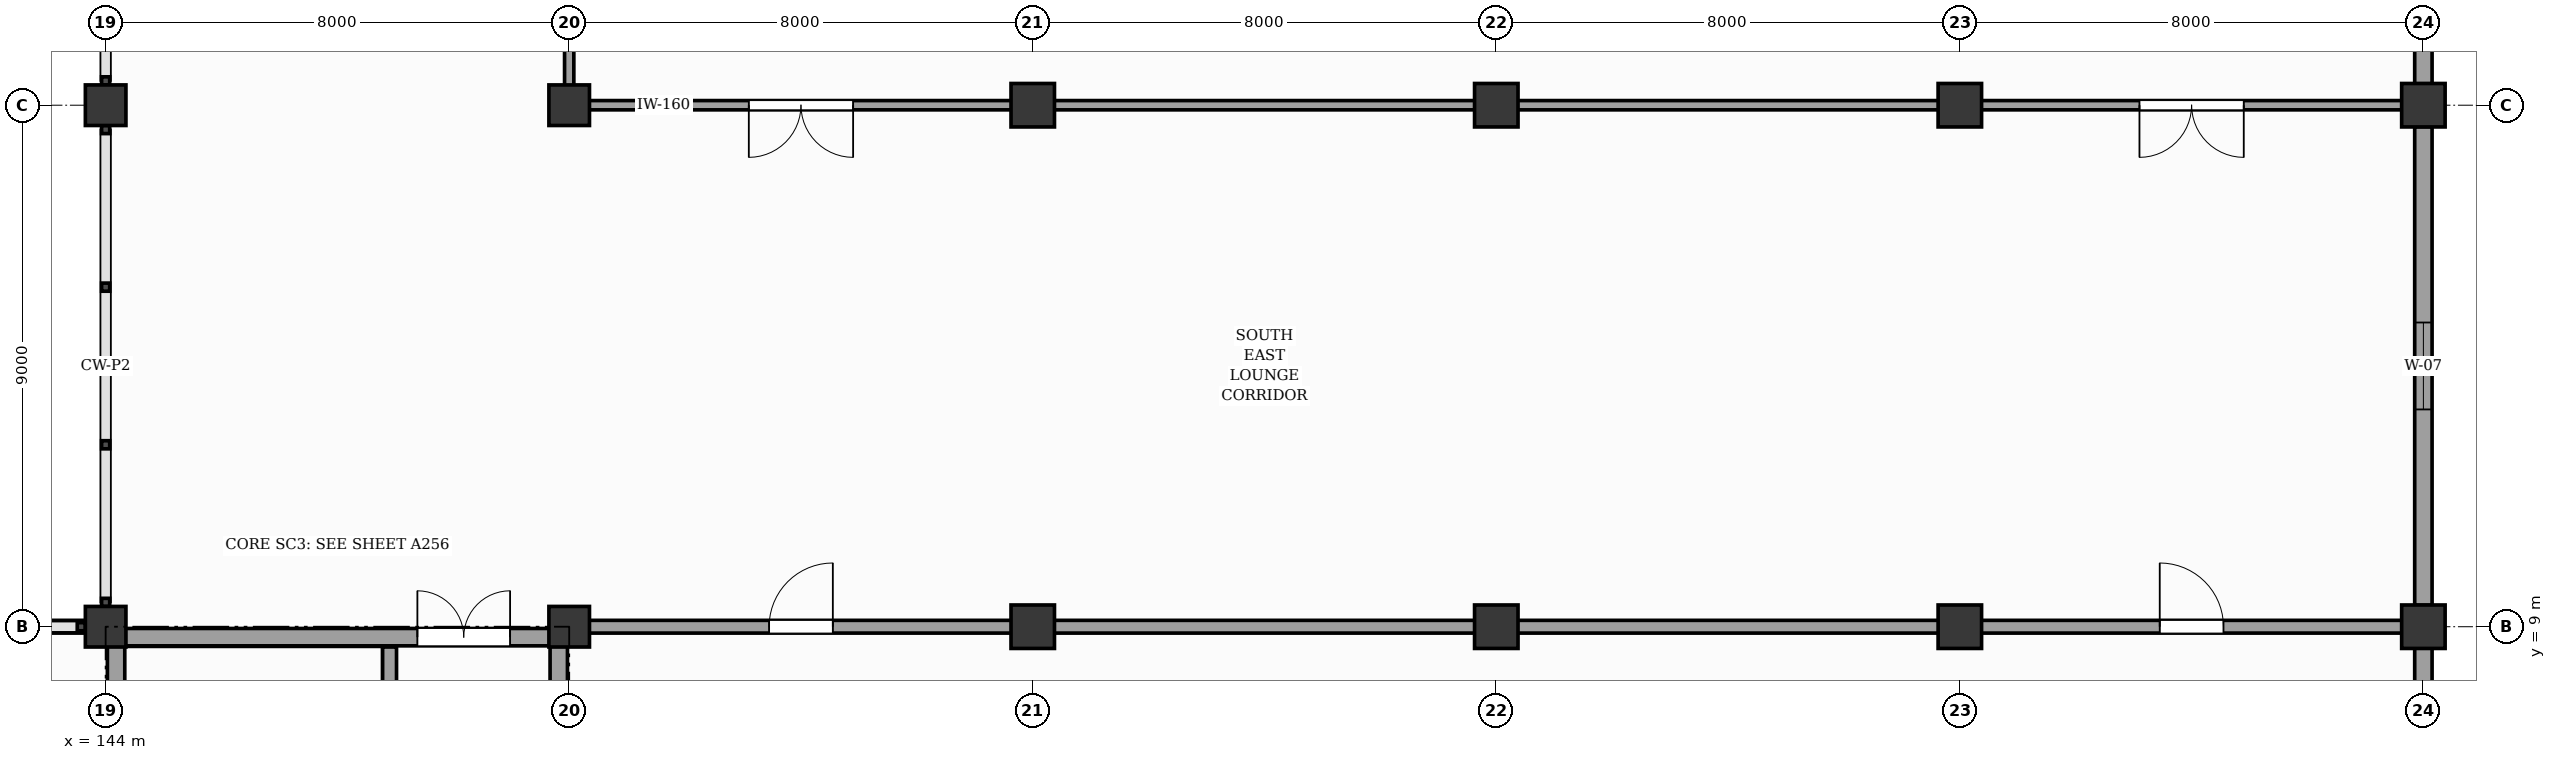
"""IFC4 building model, lengths in metres.
Left out: names, types, materials, properties, quantities, classifications, styles, units other than length and angle.
Written with IfcOpenShell. Run it as: python <this file> out.ifc"""

import sys

from ifc_helpers import new_model, si_unit, direction, frame, frame_2d, origin, origin_2d, place, context, subcontext, project, spatial, rectangle, extrude, element, fill, save


model = new_model("IFC4")
c1 = context("Model", 3, precision=1e-05, world=origin(), true_north=direction((0.0, 1.0)))
c2 = subcontext(c1, "Body", "Model", "MODEL_VIEW")
j1 = project(units=[si_unit("LENGTHUNIT", "METRE"), si_unit("PLANEANGLEUNIT", "RADIAN")], contexts=[c1])
p1 = place(None, origin())
s1 = spatial("IfcSite", under=j1, at=p1, CompositionType="ELEMENT")
p2 = place(p1, origin())
s2 = spatial("IfcBuilding", under=s1, at=p2, CompositionType="ELEMENT")
p3 = place(p2, frame((0.0, 0.0, 9.6)))
s3 = spatial("IfcBuildingStorey", under=s2, at=p3, CompositionType="ELEMENT", Elevation=9.6)
for number, where, z_axis, x_axis in (
    (1, (144.0, 9.0, 0.0), (0.0, 0.0, 1.0), (1.0, 0.0, 0.0)),
    (2, (144.0, 18.0, 0.0), (0.0, 0.0, 1.0), (1.0, 0.0, 0.0)),
    (3, (152.0, 9.0, 0.0), (0.0, 0.0, 1.0), (1.0, 0.0, 0.0)),
    (4, (152.0, 18.0, 0.0), (0.0, 0.0, 1.0), (1.0, 0.0, 0.0)),
):
    element("IfcColumn", number, at=place(p3, frame(where, z_axis=z_axis, x_axis=x_axis)), inside=s3, PredefinedType="COLUMN", context=c2, shape_type="SweptSolid", body=[
        extrude(rectangle(XDim=0.7, YDim=0.7, at=origin_2d()), origin(), (0.0, 0.0, 1.0), 6.6),
    ])
for number, where, z_axis, x_axis in (
    (5, (160.0, 9.0, 0.0), (0.0, 0.0, 1.0), (1.0, 0.0, 0.0)),
    (6, (160.0, 18.0, 0.0), (0.0, 0.0, 1.0), (1.0, 0.0, 0.0)),
    (7, (168.0, 9.0, 0.0), (0.0, 0.0, 1.0), (1.0, 0.0, 0.0)),
    (8, (168.0, 18.0, 0.0), (0.0, 0.0, 1.0), (1.0, 0.0, 0.0)),
    (9, (176.0, 9.0, 0.0), (0.0, 0.0, 1.0), (1.0, 0.0, 0.0)),
    (10, (176.0, 18.0, 0.0), (0.0, 0.0, 1.0), (1.0, 0.0, 0.0)),
    (11, (184.0, 9.0, 0.0), (0.0, 0.0, 1.0), (1.0, 0.0, 0.0)),
    (12, (184.0, 18.0, 0.0), (0.0, 0.0, 1.0), (1.0, 0.0, 0.0)),
):
    element("IfcColumn", number, at=place(p3, frame(where, z_axis=z_axis, x_axis=x_axis)), inside=s3, PredefinedType="COLUMN", context=c2, shape_type="SweptSolid", body=[
        extrude(rectangle(XDim=0.75, YDim=0.75, at=origin_2d()), origin(), (0.0, 0.0, 1.0), 6.6),
    ])
p4 = place(p3, frame((184.0, 0.295, 0.0), z_axis=(0.0, 0.0, 1.0), x_axis=(0.0, 1.0, 0.0)))
e13 = element("IfcWall", 13, at=p4, inside=s3, PredefinedType="SOLIDWALL", context=c2, shape_type="SweptSolid", body=[
    extrude(rectangle(XDim=8.335, YDim=0.3, at=frame_2d((4.167, 0.0))), origin(), (0.0, 0.0, 1.0), 5.51),
])
p5 = place(p4, frame((3.455, 0.0, 0.95)))
e14 = element("IfcOpeningElement", 14, at=p5, cuts=e13, PredefinedType="OPENING", context=c2, shape_type="SweptSolid", body=[
    extrude(rectangle(XDim=1.5, YDim=1.9, at=frame_2d((0.75, 0.95))), frame((0.0, 0.16, 0.0), z_axis=(0.0, -1.0, 0.0), x_axis=(1.0, 0.0, 0.0)), (0.0, 0.0, 1.0), 0.32),
])
p6 = place(p3, frame((184.0, 9.37, 0.0), z_axis=(0.0, 0.0, 1.0), x_axis=(0.0, 1.0, 0.0)))
e15 = element("IfcWall", 15, at=p6, inside=s3, PredefinedType="SOLIDWALL", context=c2, shape_type="SweptSolid", body=[
    extrude(rectangle(XDim=8.26, YDim=0.3, at=frame_2d((4.13, 0.0))), origin(), (0.0, 0.0, 1.0), 5.51),
])
p7 = place(p6, frame((3.38, 0.0, 0.95)))
e16 = element("IfcOpeningElement", 16, at=p7, cuts=e15, PredefinedType="OPENING", context=c2, shape_type="SweptSolid", body=[
    extrude(rectangle(XDim=1.5, YDim=1.9, at=frame_2d((0.75, 0.95))), frame((0.0, 0.16, 0.0), z_axis=(0.0, -1.0, 0.0), x_axis=(1.0, 0.0, 0.0)), (0.0, 0.0, 1.0), 0.32),
])
p8 = place(p3, frame((184.0, 18.37, 0.0), z_axis=(0.0, 0.0, 1.0), x_axis=(0.0, 1.0, 0.0)))
e17 = element("IfcWall", 17, at=p8, inside=s3, PredefinedType="SOLIDWALL", context=c2, shape_type="SweptSolid", body=[
    extrude(rectangle(XDim=8.26, YDim=0.3, at=frame_2d((4.13, 0.0))), origin(), (0.0, 0.0, 1.0), 5.51),
])
p9 = place(p8, frame((3.38, 0.0, 0.95)))
e18 = element("IfcOpeningElement", 18, at=p9, cuts=e17, PredefinedType="OPENING", context=c2, shape_type="SweptSolid", body=[
    extrude(rectangle(XDim=1.5, YDim=1.9, at=frame_2d((0.75, 0.95))), frame((0.0, 0.16, 0.0), z_axis=(0.0, -1.0, 0.0), x_axis=(1.0, 0.0, 0.0)), (0.0, 0.0, 1.0), 0.32),
])
p10 = place(p3, frame((148.9, 0.35, 0.0), z_axis=(0.0, 0.0, 1.0), x_axis=(0.0, 1.0, 0.0)))
e19 = element("IfcWall", 19, at=p10, inside=s3, PredefinedType="SHEAR", context=c2, shape_type="SweptSolid", body=[
    extrude(rectangle(XDim=8.3, YDim=0.24, at=frame_2d((4.15, 0.0))), origin(), (0.0, 0.0, 1.0), 6.32),
])
p11 = place(p10, frame((6.45, 0.0, 0.0)))
e20 = element("IfcOpeningElement", 20, at=p11, cuts=e19, PredefinedType="OPENING", context=c2, shape_type="SweptSolid", body=[
    extrude(rectangle(XDim=1.2, YDim=2.15, at=frame_2d((0.6, 1.075))), frame((0.0, 0.13, 0.0), z_axis=(0.0, -1.0, 0.0), x_axis=(1.0, 0.0, 0.0)), (0.0, 0.0, 1.0), 0.26),
])
for number, where, z_axis, x_axis in (
    (21, (144.18, 0.18, 0.0), (0.0, 0.0, 1.0), (0.0, 1.0, 0.0)),
    (22, (151.82, 0.18, 0.0), (0.0, 0.0, 1.0), (0.0, 1.0, 0.0)),
):
    element("IfcWall", number, at=place(p3, frame(where, z_axis=z_axis, x_axis=x_axis)), inside=s3, PredefinedType="SHEAR", context=c2, shape_type="SweptSolid", body=[
        extrude(rectangle(XDim=8.64, YDim=0.3, at=frame_2d((4.32, 0.0))), origin(), (0.0, 0.0, 1.0), 6.32),
    ])
p12 = place(p3, frame((144.03, 8.82, 0.0), z_axis=(0.0, 0.0, 1.0), x_axis=(1.0, 0.0, 0.0)))
e23 = element("IfcWall", 23, at=p12, inside=s3, PredefinedType="SHEAR", context=c2, shape_type="SweptSolid", body=[
    extrude(rectangle(XDim=7.94, YDim=0.3, at=frame_2d((3.97, 0.0))), origin(), (0.0, 0.0, 1.0), 6.32),
])
p13 = place(p12, frame((5.35, 0.0, 0.0)))
e24 = element("IfcOpeningElement", 24, at=p13, cuts=e23, PredefinedType="OPENING", context=c2, shape_type="SweptSolid", body=[
    extrude(rectangle(XDim=1.6, YDim=2.15, at=frame_2d((0.8, 1.075))), frame((0.0, 0.16, 0.0), z_axis=(0.0, -1.0, 0.0), x_axis=(1.0, 0.0, 0.0)), (0.0, 0.0, 1.0), 0.32),
])
p14 = place(p3, frame((136.3, 9.0, 0.0), z_axis=(0.0, 0.0, 1.0), x_axis=(1.0, 0.0, 0.0)))
e25 = element("IfcWall", 25, at=p14, inside=s3, PredefinedType="SOLIDWALL", context=c2, shape_type="SweptSolid", body=[
    extrude(rectangle(XDim=7.4, YDim=0.22, at=frame_2d((3.7, 0.0))), origin(), (0.0, 0.0, 1.0), 5.5),
])
p15 = place(p3, frame((152.3, 18.0, 0.0), z_axis=(0.0, 0.0, 1.0), x_axis=(1.0, 0.0, 0.0)))
e26 = element("IfcWall", 26, at=p15, inside=s3, PredefinedType="PARTITIONING", context=c2, shape_type="SweptSolid", body=[
    extrude(rectangle(XDim=7.4, YDim=0.16, at=frame_2d((3.7, 0.0))), origin(), (0.0, 0.0, 1.0), 5.5),
])
p16 = place(p15, frame((2.8, 0.0, 0.0)))
e27 = element("IfcOpeningElement", 27, at=p16, cuts=e26, PredefinedType="OPENING", context=c2, shape_type="SweptSolid", body=[
    extrude(rectangle(XDim=1.8, YDim=2.25, at=frame_2d((0.9, 1.125))), frame((0.0, 0.09, 0.0), z_axis=(0.0, -1.0, 0.0), x_axis=(1.0, 0.0, 0.0)), (0.0, 0.0, 1.0), 0.18),
])
for number, where, z_axis, x_axis in (
    (28, (160.3, 18.0, 0.0), (0.0, 0.0, 1.0), (1.0, 0.0, 0.0)),
    (29, (168.3, 18.0, 0.0), (0.0, 0.0, 1.0), (1.0, 0.0, 0.0)),
):
    element("IfcWall", number, at=place(p3, frame(where, z_axis=z_axis, x_axis=x_axis)), inside=s3, PredefinedType="PARTITIONING", context=c2, shape_type="SweptSolid", body=[
        extrude(rectangle(XDim=7.4, YDim=0.16, at=frame_2d((3.7, 0.0))), origin(), (0.0, 0.0, 1.0), 5.5),
    ])
p17 = place(p3, frame((176.3, 18.0, 0.0), z_axis=(0.0, 0.0, 1.0), x_axis=(1.0, 0.0, 0.0)))
e30 = element("IfcWall", 30, at=p17, inside=s3, PredefinedType="PARTITIONING", context=c2, shape_type="SweptSolid", body=[
    extrude(rectangle(XDim=7.4, YDim=0.16, at=frame_2d((3.7, 0.0))), origin(), (0.0, 0.0, 1.0), 5.5),
])
p18 = place(p17, frame((2.8, 0.0, 0.0)))
e31 = element("IfcOpeningElement", 31, at=p18, cuts=e30, PredefinedType="OPENING", context=c2, shape_type="SweptSolid", body=[
    extrude(rectangle(XDim=1.8, YDim=2.25, at=frame_2d((0.9, 1.125))), frame((0.0, 0.09, 0.0), z_axis=(0.0, -1.0, 0.0), x_axis=(1.0, 0.0, 0.0)), (0.0, 0.0, 1.0), 0.18),
])
p19 = place(p3, frame((152.0, 18.3, 0.0), z_axis=(0.0, 0.0, 1.0), x_axis=(0.0, 1.0, 0.0)))
e32 = element("IfcWall", 32, at=p19, inside=s3, PredefinedType="PARTITIONING", context=c2, shape_type="SweptSolid", body=[
    extrude(rectangle(XDim=8.4, YDim=0.16, at=frame_2d((4.2, 0.0))), origin(), (0.0, 0.0, 1.0), 5.5),
])
p20 = place(p3, frame((152.3, 9.0, 0.0), z_axis=(0.0, 0.0, 1.0), x_axis=(1.0, 0.0, 0.0)))
e33 = element("IfcWall", 33, at=p20, inside=s3, PredefinedType="SOLIDWALL", context=c2, shape_type="SweptSolid", body=[
    extrude(rectangle(XDim=7.4, YDim=0.22, at=frame_2d((3.7, 0.0))), origin(), (0.0, 0.0, 1.0), 5.5),
])
p21 = place(p20, frame((3.15, 0.0, 0.0)))
e34 = element("IfcOpeningElement", 34, at=p21, cuts=e33, PredefinedType="OPENING", context=c2, shape_type="SweptSolid", body=[
    extrude(rectangle(XDim=1.1, YDim=2.15, at=frame_2d((0.55, 1.075))), frame((0.0, 0.12, 0.0), z_axis=(0.0, -1.0, 0.0), x_axis=(1.0, 0.0, 0.0)), (0.0, 0.0, 1.0), 0.24),
])
for number, where, z_axis, x_axis in (
    (35, (160.3, 9.0, 0.0), (0.0, 0.0, 1.0), (1.0, 0.0, 0.0)),
    (36, (168.3, 9.0, 0.0), (0.0, 0.0, 1.0), (1.0, 0.0, 0.0)),
):
    element("IfcWall", number, at=place(p3, frame(where, z_axis=z_axis, x_axis=x_axis)), inside=s3, PredefinedType="SOLIDWALL", context=c2, shape_type="SweptSolid", body=[
        extrude(rectangle(XDim=7.4, YDim=0.22, at=frame_2d((3.7, 0.0))), origin(), (0.0, 0.0, 1.0), 5.5),
    ])
p22 = place(p3, frame((176.3, 9.0, 0.0), z_axis=(0.0, 0.0, 1.0), x_axis=(1.0, 0.0, 0.0)))
e37 = element("IfcWall", 37, at=p22, inside=s3, PredefinedType="SOLIDWALL", context=c2, shape_type="SweptSolid", body=[
    extrude(rectangle(XDim=7.4, YDim=0.22, at=frame_2d((3.7, 0.0))), origin(), (0.0, 0.0, 1.0), 5.5),
])
p23 = place(p22, frame((3.15, 0.0, 0.0)))
e38 = element("IfcOpeningElement", 38, at=p23, cuts=e37, PredefinedType="OPENING", context=c2, shape_type="SweptSolid", body=[
    extrude(rectangle(XDim=1.1, YDim=2.15, at=frame_2d((0.55, 1.075))), frame((0.0, 0.12, 0.0), z_axis=(0.0, -1.0, 0.0), x_axis=(1.0, 0.0, 0.0)), (0.0, 0.0, 1.0), 0.24),
])
p24 = place(p7, origin())
e39 = element("IfcWindow", 39, at=p24, inside=s3, PartitioningType="SINGLE_PANEL", PredefinedType="WINDOW", context=c2, shape_type="SweptSolid", body=[
    extrude(rectangle(XDim=1.5, YDim=1.9, at=frame_2d((0.75, 0.95))), frame((0.0, 0.03, 0.0), z_axis=(0.0, -1.0, 0.0), x_axis=(1.0, 0.0, 0.0)), (0.0, 0.0, 1.0), 0.06),
])
fill(e16, e39)
p25 = place(p13, origin())
e40 = element("IfcDoor", 40, at=p25, inside=s3, OperationType="DOUBLE_DOOR_SINGLE_SWING", PredefinedType="DOOR", context=c2, shape_type="SweptSolid", body=[
    extrude(rectangle(XDim=1.6, YDim=2.15, at=frame_2d((0.8, 1.075))), frame((0.0, 0.025, 0.0), z_axis=(0.0, -1.0, 0.0), x_axis=(1.0, 0.0, 0.0)), (0.0, 0.0, 1.0), 0.05),
])
fill(e24, e40)
p26 = place(p16, frame((1.8, 0.0, 0.0), z_axis=(0.0, 0.0, 1.0), x_axis=(-1.0, 0.0, 0.0)))
e41 = element("IfcDoor", 41, at=p26, inside=s3, OperationType="DOUBLE_DOOR_SINGLE_SWING", PredefinedType="DOOR", context=c2, shape_type="SweptSolid", body=[
    extrude(rectangle(XDim=1.8, YDim=2.25, at=frame_2d((0.9, 1.125))), frame((0.0, 0.025, 0.0), z_axis=(0.0, -1.0, 0.0), x_axis=(1.0, 0.0, 0.0)), (0.0, 0.0, 1.0), 0.05),
])
fill(e27, e41)
p27 = place(p18, frame((1.8, 0.0, 0.0), z_axis=(0.0, 0.0, 1.0), x_axis=(-1.0, 0.0, 0.0)))
e42 = element("IfcDoor", 42, at=p27, inside=s3, OperationType="DOUBLE_DOOR_SINGLE_SWING", PredefinedType="DOOR", context=c2, shape_type="SweptSolid", body=[
    extrude(rectangle(XDim=1.8, YDim=2.25, at=frame_2d((0.9, 1.125))), frame((0.0, 0.025, 0.0), z_axis=(0.0, -1.0, 0.0), x_axis=(1.0, 0.0, 0.0)), (0.0, 0.0, 1.0), 0.05),
])
fill(e31, e42)
p28 = place(p21, origin())
e43 = element("IfcDoor", 43, at=p28, inside=s3, OperationType="SINGLE_SWING_RIGHT", PredefinedType="DOOR", context=c2, shape_type="SweptSolid", body=[
    extrude(rectangle(XDim=1.1, YDim=2.15, at=frame_2d((0.55, 1.075))), frame((0.0, 0.025, 0.0), z_axis=(0.0, -1.0, 0.0), x_axis=(1.0, 0.0, 0.0)), (0.0, 0.0, 1.0), 0.05),
])
fill(e34, e43)
p29 = place(p23, origin())
e44 = element("IfcDoor", 44, at=p29, inside=s3, OperationType="SINGLE_SWING_LEFT", PredefinedType="DOOR", context=c2, shape_type="SweptSolid", body=[
    extrude(rectangle(XDim=1.1, YDim=2.15, at=frame_2d((0.55, 1.075))), frame((0.0, 0.025, 0.0), z_axis=(0.0, -1.0, 0.0), x_axis=(1.0, 0.0, 0.0)), (0.0, 0.0, 1.0), 0.05),
])
fill(e38, e44)
save(model, sys.argv[1])
